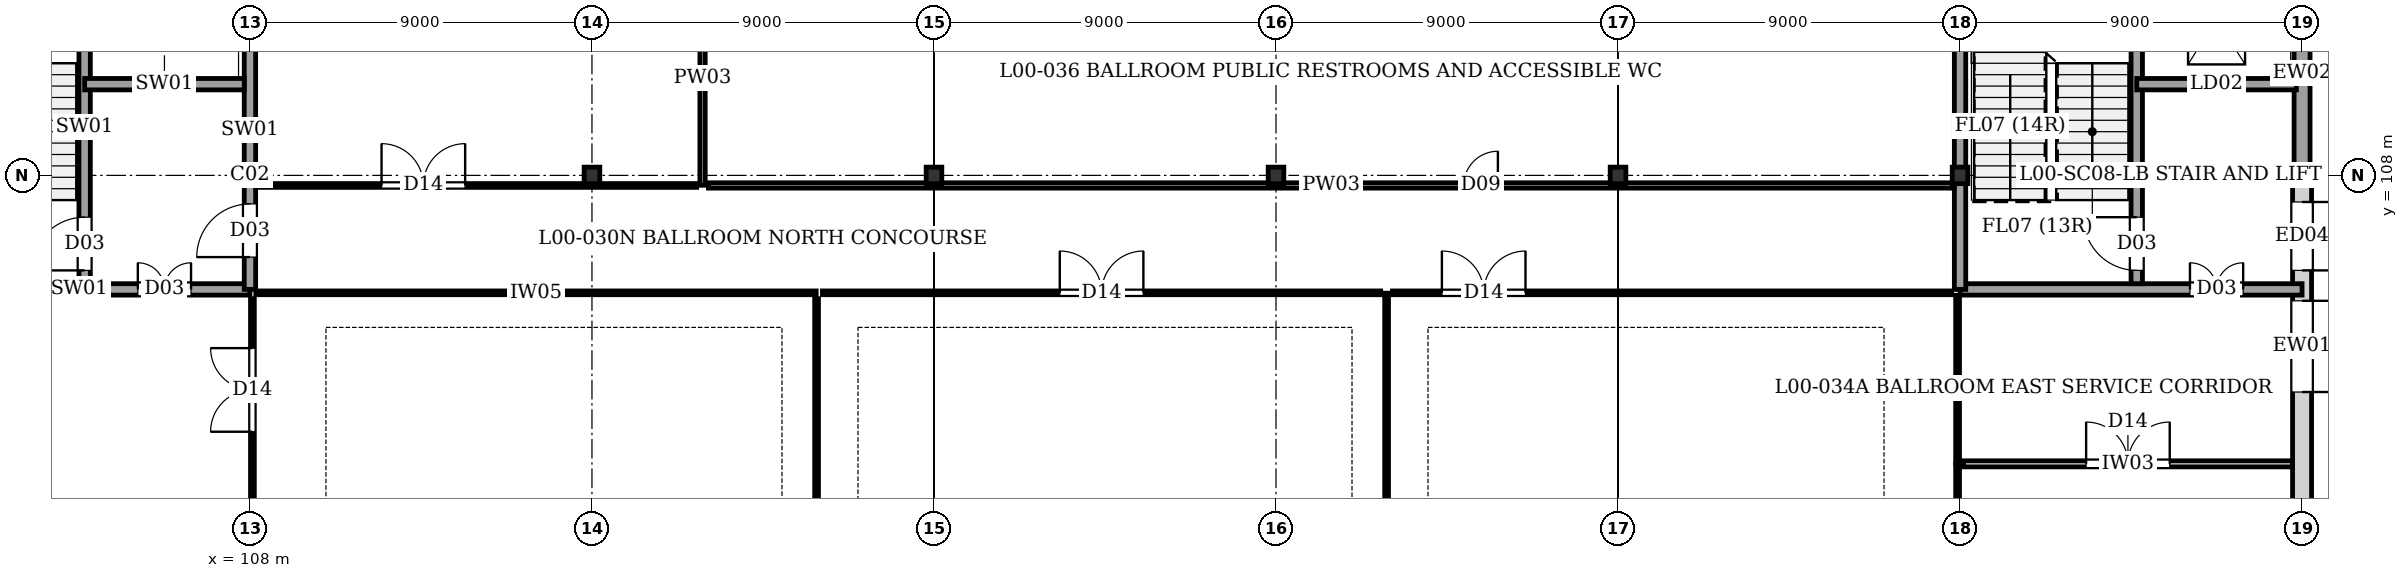
"""IFC4 building model, lengths in metres.
Left out: names, types, materials, properties, quantities, classifications, styles, units other than length and angle.
Written with IfcOpenShell. Run it as: python <this file> out.ifc"""

import sys

from ifc_helpers import new_model, si_unit, direction, frame, frame_2d, origin, origin_2d, place, context, subcontext, project, spatial, rectangle, i_section, extrude, element, fill, save


model = new_model("IFC4")
c1 = context("Model", 3, precision=1e-05, world=origin(), true_north=direction((0.0, 1.0)))
c2 = subcontext(c1, "Body", "Model", "MODEL_VIEW")
j1 = project(units=[si_unit("LENGTHUNIT", "METRE"), si_unit("PLANEANGLEUNIT", "RADIAN")], contexts=[c1])
p1 = place(None, origin())
s1 = spatial("IfcSite", under=j1, at=p1, CompositionType="ELEMENT")
p2 = place(p1, origin())
s2 = spatial("IfcBuilding", under=s1, at=p2, CompositionType="ELEMENT")
p3 = place(p2, origin())
s3 = spatial("IfcBuildingStorey", under=s2, at=p3, CompositionType="ELEMENT", Elevation=0.0)
for number, where, z_axis, x_axis in (
    (1, (108.0, 108.0, 0.0), (0.0, 0.0, 1.0), (1.0, 0.0, 0.0)),
    (2, (117.0, 108.0, 0.0), (0.0, 0.0, 1.0), (1.0, 0.0, 0.0)),
    (3, (126.0, 108.0, 0.0), (0.0, 0.0, 1.0), (1.0, 0.0, 0.0)),
    (4, (135.0, 108.0, 0.0), (0.0, 0.0, 1.0), (1.0, 0.0, 0.0)),
    (5, (144.0, 108.0, 0.0), (0.0, 0.0, 1.0), (1.0, 0.0, 0.0)),
    (6, (153.0, 108.0, 0.0), (0.0, 0.0, 1.0), (1.0, 0.0, 0.0)),
):
    element("IfcColumn", number, at=place(p3, frame(where, z_axis=z_axis, x_axis=x_axis)), inside=s3, PredefinedType="COLUMN", context=c2, shape_type="SweptSolid", body=[
        extrude(i_section(OverallWidth=0.412, OverallDepth=0.435, WebThickness=0.027, FlangeThickness=0.046, at=origin_2d()), origin(), (0.0, 0.0, 1.0), 4.32),
    ])
p4 = place(p3, frame((162.0, 108.0, 0.0), z_axis=(0.0, 0.0, 1.0), x_axis=(1.0, 0.0, 0.0)))
e7 = element("IfcColumn", 7, at=p4, inside=s3, PredefinedType="COLUMN", context=c2, shape_type="SweptSolid", body=[
    extrude(i_section(OverallWidth=0.3, OverallDepth=0.5, WebThickness=0.014, FlangeThickness=0.028, at=origin_2d()), origin(), (0.0, 0.0, 1.0), 4.32),
])
p5 = place(p3, frame((162.0, 114.0, 0.0), z_axis=(0.0, 0.0, 1.0), x_axis=(0.0, -1.0, 0.0)))
e8 = element("IfcWall", 8, at=p5, inside=s3, PredefinedType="SOLIDWALL", context=c2, shape_type="SweptSolid", body=[
    extrude(rectangle(XDim=6.0, YDim=0.42, at=frame_2d((3.0, 0.0))), origin(), (0.0, 0.0, 1.0), 4.055),
])
p6 = place(p3, frame((162.0, 108.0, 0.0), z_axis=(0.0, 0.0, 1.0), x_axis=(0.0, -1.0, 0.0)))
e9 = element("IfcWall", 9, at=p6, inside=s3, PredefinedType="SOLIDWALL", context=c2, shape_type="SweptSolid", body=[
    extrude(rectangle(XDim=9.0, YDim=0.5, at=frame_2d((4.5, 0.0))), origin(), (0.0, 0.0, 1.0), 3.695),
])
p7 = place(p6, frame((0.7, 0.0, 0.0)))
e10 = element("IfcOpeningElement", 10, at=p7, cuts=e9, PredefinedType="OPENING", context=c2, shape_type="SweptSolid", body=[
    extrude(rectangle(XDim=1.8, YDim=2.2, at=frame_2d((0.9, 1.1))), frame((0.0, 0.26, 0.0), z_axis=(0.0, -1.0, 0.0), x_axis=(1.0, 0.0, 0.0)), (0.0, 0.0, 1.0), 0.52),
])
p8 = place(p6, frame((3.3, 0.0, 0.0)))
e11 = element("IfcOpeningElement", 11, at=p8, cuts=e9, PredefinedType="OPENING", context=c2, shape_type="SweptSolid", body=[
    extrude(rectangle(XDim=2.4, YDim=2.5, at=frame_2d((1.2, 1.25))), frame((0.0, 0.26, 0.0), z_axis=(0.0, -1.0, 0.0), x_axis=(1.0, 0.0, 0.0)), (0.0, 0.0, 1.0), 0.52),
])
p9 = place(p3, frame((99.0, 105.0, 0.0), z_axis=(0.0, 0.0, 1.0), x_axis=(1.0, 0.0, 0.0)))
e12 = element("IfcWall", 12, at=p9, inside=s3, PredefinedType="SHEAR", context=c2, shape_type="SweptSolid", body=[
    extrude(rectangle(XDim=9.0, YDim=0.3, at=frame_2d((4.5, 0.0))), origin(), (0.0, 0.0, 1.0), 4.055),
])
p10 = place(p9, frame((6.05, 0.0, 0.0)))
e13 = element("IfcOpeningElement", 13, at=p10, cuts=e12, PredefinedType="OPENING", context=c2, shape_type="SweptSolid", body=[
    extrude(rectangle(XDim=1.4, YDim=2.02, at=frame_2d((0.7, 1.01))), frame((0.0, 0.16, 0.0), z_axis=(0.0, -1.0, 0.0), x_axis=(1.0, 0.0, 0.0)), (0.0, 0.0, 1.0), 0.32),
])
p11 = place(p3, frame((108.0, 105.0, 0.0), z_axis=(0.0, 0.0, 1.0), x_axis=(0.0, 1.0, 0.0)))
e14 = element("IfcWall", 14, at=p11, inside=s3, PredefinedType="SHEAR", context=c2, shape_type="SweptSolid", body=[
    extrude(rectangle(XDim=9.0, YDim=0.3, at=frame_2d((4.5, 0.0))), origin(), (0.0, 0.0, 1.0), 4.055),
])
p12 = place(p11, frame((0.85, 0.0, 0.0)))
e15 = element("IfcOpeningElement", 15, at=p12, cuts=e14, PredefinedType="OPENING", context=c2, shape_type="SweptSolid", body=[
    extrude(rectangle(XDim=1.4, YDim=2.02, at=frame_2d((0.7, 1.01))), frame((0.0, 0.16, 0.0), z_axis=(0.0, -1.0, 0.0), x_axis=(1.0, 0.0, 0.0)), (0.0, 0.0, 1.0), 0.32),
])
p13 = place(p3, frame((103.65, 105.15, 0.0), z_axis=(0.0, 0.0, 1.0), x_axis=(0.0, 1.0, 0.0)))
e16 = element("IfcWall", 16, at=p13, inside=s3, PredefinedType="SHEAR", context=c2, shape_type="SweptSolid", body=[
    extrude(rectangle(XDim=8.7, YDim=0.3, at=frame_2d((4.35, 0.0))), origin(), (0.0, 0.0, 1.0), 4.055),
])
p14 = place(p13, frame((0.35, 0.0, 0.0)))
e17 = element("IfcOpeningElement", 17, at=p14, cuts=e16, PredefinedType="OPENING", context=c2, shape_type="SweptSolid", body=[
    extrude(rectangle(XDim=1.4, YDim=2.02, at=frame_2d((0.7, 1.01))), frame((0.0, 0.16, 0.0), z_axis=(0.0, -1.0, 0.0), x_axis=(1.0, 0.0, 0.0)), (0.0, 0.0, 1.0), 0.32),
])
p15 = place(p3, frame((103.65, 110.4, 0.0), z_axis=(0.0, 0.0, 1.0), x_axis=(1.0, 0.0, 0.0)))
e18 = element("IfcWall", 18, at=p15, inside=s3, PredefinedType="SHEAR", context=c2, shape_type="SweptSolid", body=[
    extrude(rectangle(XDim=4.2, YDim=0.3, at=frame_2d((2.1, 0.0))), origin(), (0.0, 0.0, 1.0), 4.055),
])
p16 = place(p15, frame((1.5, 0.0, 0.0)))
e19 = element("IfcOpeningElement", 19, at=p16, cuts=e18, PredefinedType="OPENING", context=c2, shape_type="SweptSolid", body=[
    extrude(rectangle(XDim=1.2, YDim=2.2, at=frame_2d((0.6, 1.1))), frame((0.0, 0.16, 0.0), z_axis=(0.0, -1.0, 0.0), x_axis=(1.0, 0.0, 0.0)), (0.0, 0.0, 1.0), 0.32),
])
p17 = place(p3, frame((153.0, 105.0, 0.0), z_axis=(0.0, 0.0, 1.0), x_axis=(1.0, 0.0, 0.0)))
e20 = element("IfcWall", 20, at=p17, inside=s3, PredefinedType="SHEAR", context=c2, shape_type="SweptSolid", body=[
    extrude(rectangle(XDim=9.0, YDim=0.3, at=frame_2d((4.5, 0.0))), origin(), (0.0, 0.0, 1.0), 4.055),
])
p18 = place(p17, frame((6.05, 0.0, 0.0)))
e21 = element("IfcOpeningElement", 21, at=p18, cuts=e20, PredefinedType="OPENING", context=c2, shape_type="SweptSolid", body=[
    extrude(rectangle(XDim=1.4, YDim=2.02, at=frame_2d((0.7, 1.01))), frame((0.0, 0.16, 0.0), z_axis=(0.0, -1.0, 0.0), x_axis=(1.0, 0.0, 0.0)), (0.0, 0.0, 1.0), 0.32),
])
p19 = place(p3, frame((153.0, 105.0, 0.0), z_axis=(0.0, 0.0, 1.0), x_axis=(0.0, 1.0, 0.0)))
e22 = element("IfcWall", 22, at=p19, inside=s3, PredefinedType="SHEAR", context=c2, shape_type="SweptSolid", body=[
    extrude(rectangle(XDim=9.0, YDim=0.3, at=frame_2d((4.5, 0.0))), origin(), (0.0, 0.0, 1.0), 4.055),
])
p20 = place(p3, frame((157.65, 105.15, 0.0), z_axis=(0.0, 0.0, 1.0), x_axis=(0.0, 1.0, 0.0)))
e23 = element("IfcWall", 23, at=p20, inside=s3, PredefinedType="SHEAR", context=c2, shape_type="SweptSolid", body=[
    extrude(rectangle(XDim=8.7, YDim=0.3, at=frame_2d((4.35, 0.0))), origin(), (0.0, 0.0, 1.0), 4.055),
])
p21 = place(p20, frame((0.35, 0.0, 0.0)))
e24 = element("IfcOpeningElement", 24, at=p21, cuts=e23, PredefinedType="OPENING", context=c2, shape_type="SweptSolid", body=[
    extrude(rectangle(XDim=1.4, YDim=2.02, at=frame_2d((0.7, 1.01))), frame((0.0, 0.16, 0.0), z_axis=(0.0, -1.0, 0.0), x_axis=(1.0, 0.0, 0.0)), (0.0, 0.0, 1.0), 0.32),
])
p22 = place(p3, frame((157.65, 110.4, 0.0), z_axis=(0.0, 0.0, 1.0), x_axis=(1.0, 0.0, 0.0)))
e25 = element("IfcWall", 25, at=p22, inside=s3, PredefinedType="SHEAR", context=c2, shape_type="SweptSolid", body=[
    extrude(rectangle(XDim=4.2, YDim=0.3, at=frame_2d((2.1, 0.0))), origin(), (0.0, 0.0, 1.0), 4.055),
])
p23 = place(p22, frame((1.5, 0.0, 0.0)))
e26 = element("IfcOpeningElement", 26, at=p23, cuts=e25, PredefinedType="OPENING", context=c2, shape_type="SweptSolid", body=[
    extrude(rectangle(XDim=1.2, YDim=2.2, at=frame_2d((0.6, 1.1))), frame((0.0, 0.16, 0.0), z_axis=(0.0, -1.0, 0.0), x_axis=(1.0, 0.0, 0.0)), (0.0, 0.0, 1.0), 0.32),
])
p24 = place(p3, frame((108.155, 104.91, 0.0), z_axis=(0.0, 0.0, 1.0), x_axis=(1.0, 0.0, 0.0)))
e27 = element("IfcWall", 27, at=p24, inside=s3, PredefinedType="PARTITIONING", context=c2, shape_type="SweptSolid", body=[
    extrude(rectangle(XDim=14.745, YDim=0.1, at=frame_2d((7.373, 0.0))), origin(), (0.0, 0.0, 1.0), 4.055),
])
p25 = place(p3, frame((122.91, 72.255, 0.0), z_axis=(0.0, 0.0, 1.0), x_axis=(0.0, 1.0, 0.0)))
e28 = element("IfcWall", 28, at=p25, inside=s3, PredefinedType="PARTITIONING", context=c2, shape_type="SweptSolid", body=[
    extrude(rectangle(XDim=32.5, YDim=0.1, at=frame_2d((16.25, 0.0))), origin(), (0.0, 0.0, 1.0), 4.055),
])
p26 = place(p3, frame((137.91, 72.255, 0.0), z_axis=(0.0, 0.0, 1.0), x_axis=(0.0, 1.0, 0.0)))
e29 = element("IfcWall", 29, at=p26, inside=s3, PredefinedType="PARTITIONING", context=c2, shape_type="SweptSolid", body=[
    extrude(rectangle(XDim=32.645, YDim=0.1, at=frame_2d((16.323, 0.0))), origin(), (0.0, 0.0, 1.0), 4.055),
])
p27 = place(p3, frame((152.935, 100.42, 0.0), z_axis=(0.0, 0.0, 1.0), x_axis=(0.0, 1.0, 0.0)))
e30 = element("IfcWall", 30, at=p27, inside=s3, PredefinedType="PARTITIONING", context=c2, shape_type="SweptSolid", body=[
    extrude(rectangle(XDim=4.425, YDim=0.1, at=frame_2d((2.212, 0.0))), origin(), (0.0, 0.0, 1.0), 3.665),
])
p28 = place(p3, frame((119.91, 107.74, 0.0), z_axis=(0.0, 0.0, 1.0), x_axis=(0.0, 1.0, 0.0)))
e31 = element("IfcWall", 31, at=p28, inside=s3, PredefinedType="PLUMBINGWALL", context=c2, shape_type="SweptSolid", body=[
    extrude(rectangle(XDim=6.005, YDim=0.14, at=frame_2d((3.002, 0.0))), origin(), (0.0, 0.0, 1.0), 4.055),
])
p29 = place(p3, frame((123.065, 104.91, 0.0), z_axis=(0.0, 0.0, 1.0), x_axis=(1.0, 0.0, 0.0)))
e32 = element("IfcWall", 32, at=p29, inside=s3, PredefinedType="PARTITIONING", context=c2, shape_type="SweptSolid", body=[
    extrude(rectangle(XDim=14.69, YDim=0.1, at=frame_2d((7.345, 0.0))), origin(), (0.0, 0.0, 1.0), 4.055),
])
p30 = place(p29, frame((6.245, 0.0, 0.0)))
e33 = element("IfcOpeningElement", 33, at=p30, cuts=e32, PredefinedType="OPENING", context=c2, shape_type="SweptSolid", body=[
    extrude(rectangle(XDim=2.2, YDim=2.45, at=frame_2d((1.1, 1.225))), frame((0.0, 0.06, 0.0), z_axis=(0.0, -1.0, 0.0), x_axis=(1.0, 0.0, 0.0)), (0.0, 0.0, 1.0), 0.12),
])
p31 = place(p3, frame((138.065, 104.91, 0.0), z_axis=(0.0, 0.0, 1.0), x_axis=(1.0, 0.0, 0.0)))
e34 = element("IfcWall", 34, at=p31, inside=s3, PredefinedType="PARTITIONING", context=c2, shape_type="SweptSolid", body=[
    extrude(rectangle(XDim=14.715, YDim=0.1, at=frame_2d((7.357, 0.0))), origin(), (0.0, 0.0, 1.0), 4.055),
])
p32 = place(p31, frame((1.3, 0.0, 0.0)))
e35 = element("IfcOpeningElement", 35, at=p32, cuts=e34, PredefinedType="OPENING", context=c2, shape_type="SweptSolid", body=[
    extrude(rectangle(XDim=2.2, YDim=2.45, at=frame_2d((1.1, 1.225))), frame((0.0, 0.06, 0.0), z_axis=(0.0, -1.0, 0.0), x_axis=(1.0, 0.0, 0.0)), (0.0, 0.0, 1.0), 0.12),
])
p33 = place(p3, frame((108.155, 107.735, 0.0), z_axis=(0.0, 0.0, 1.0), x_axis=(1.0, 0.0, 0.0)))
e36 = element("IfcWall", 36, at=p33, inside=s3, PredefinedType="PARTITIONING", context=c2, shape_type="SweptSolid", body=[
    extrude(rectangle(XDim=11.6, YDim=0.1, at=frame_2d((5.8, 0.0))), origin(), (0.0, 0.0, 1.0), 4.055),
])
p34 = place(p33, frame((3.308, 0.0, 0.0)))
e37 = element("IfcOpeningElement", 37, at=p34, cuts=e36, PredefinedType="OPENING", context=c2, shape_type="SweptSolid", body=[
    extrude(rectangle(XDim=2.2, YDim=2.45, at=frame_2d((1.1, 1.225))), frame((0.0, 0.06, 0.0), z_axis=(0.0, -1.0, 0.0), x_axis=(1.0, 0.0, 0.0)), (0.0, 0.0, 1.0), 0.12),
])
p35 = place(p3, frame((120.065, 107.735, 0.0), z_axis=(0.0, 0.0, 1.0), x_axis=(1.0, 0.0, 0.0)))
e38 = element("IfcWall", 38, at=p35, inside=s3, PredefinedType="PLUMBINGWALL", context=c2, shape_type="SweptSolid", body=[
    extrude(rectangle(XDim=32.78, YDim=0.14, at=frame_2d((16.39, 0.0))), origin(), (0.0, 0.0, 1.0), 4.055),
])
p36 = place(p35, frame((19.874, 0.0, 0.0)))
e39 = element("IfcOpeningElement", 39, at=p36, cuts=e38, PredefinedType="OPENING", context=c2, shape_type="SweptSolid", body=[
    extrude(rectangle(XDim=0.9, YDim=2.1, at=frame_2d((0.45, 1.05))), frame((0.0, 0.08, 0.0), z_axis=(0.0, -1.0, 0.0), x_axis=(1.0, 0.0, 0.0)), (0.0, 0.0, 1.0), 0.16),
])
p37 = place(p3, frame((153.09, 100.41, 0.0), z_axis=(0.0, 0.0, 1.0), x_axis=(1.0, 0.0, 0.0)))
e40 = element("IfcWall", 40, at=p37, inside=s3, PredefinedType="PARTITIONING", context=c2, shape_type="SweptSolid", body=[
    extrude(rectangle(XDim=8.655, YDim=0.16, at=frame_2d((4.328, 0.0))), origin(), (0.0, 0.0, 1.0), 4.055),
])
p38 = place(p37, frame((3.228, 0.0, 0.0)))
e41 = element("IfcOpeningElement", 41, at=p38, cuts=e40, PredefinedType="OPENING", context=c2, shape_type="SweptSolid", body=[
    extrude(rectangle(XDim=2.2, YDim=2.45, at=frame_2d((1.1, 1.225))), frame((0.0, 0.09, 0.0), z_axis=(0.0, -1.0, 0.0), x_axis=(1.0, 0.0, 0.0)), (0.0, 0.0, 1.0), 0.18),
])
p39 = place(p3, frame((152.935, 98.98, 0.0), z_axis=(0.0, 0.0, 1.0), x_axis=(0.0, 1.0, 0.0)))
e42 = element("IfcWall", 42, at=p39, inside=s3, PredefinedType="PARTITIONING", context=c2, shape_type="SweptSolid", body=[
    extrude(rectangle(XDim=1.42, YDim=0.1, at=frame_2d((0.71, 0.0))), origin(), (0.0, 0.0, 1.0), 3.665),
])
p40 = place(p3, frame((108.065, 98.98, 0.0), z_axis=(0.0, 0.0, 1.0), x_axis=(0.0, 1.0, 0.0)))
e43 = element("IfcWall", 43, at=p40, inside=s3, PredefinedType="PARTITIONING", context=c2, shape_type="SweptSolid", body=[
    extrude(rectangle(XDim=5.775, YDim=0.1, at=frame_2d((2.887, 0.0))), origin(), (0.0, 0.0, 1.0), 3.695),
])
p41 = place(p40, frame((2.275, 0.0, 0.0)))
e44 = element("IfcOpeningElement", 44, at=p41, cuts=e43, PredefinedType="OPENING", context=c2, shape_type="SweptSolid", body=[
    extrude(rectangle(XDim=2.2, YDim=2.45, at=frame_2d((1.1, 1.225))), frame((0.0, 0.06, 0.0), z_axis=(0.0, -1.0, 0.0), x_axis=(1.0, 0.0, 0.0)), (0.0, 0.0, 1.0), 0.12),
])
p42 = place(p7, origin())
e45 = element("IfcDoor", 45, at=p42, inside=s3, OperationType="DOUBLE_DOOR_SINGLE_SWING", PredefinedType="DOOR", context=c2, shape_type="SweptSolid", body=[
    extrude(rectangle(XDim=1.8, YDim=2.2, at=frame_2d((0.9, 1.1))), frame((0.0, 0.025, 0.0), z_axis=(0.0, -1.0, 0.0), x_axis=(1.0, 0.0, 0.0)), (0.0, 0.0, 1.0), 0.05),
])
fill(e10, e45)
p43 = place(p8, origin())
e46 = element("IfcDoor", 46, at=p43, inside=s3, OperationType="DOUBLE_DOOR_SINGLE_SWING", PredefinedType="DOOR", context=c2, shape_type="SweptSolid", body=[
    extrude(rectangle(XDim=2.4, YDim=2.5, at=frame_2d((1.2, 1.25))), frame((0.0, 0.025, 0.0), z_axis=(0.0, -1.0, 0.0), x_axis=(1.0, 0.0, 0.0)), (0.0, 0.0, 1.0), 0.05),
])
fill(e11, e46)
p44 = place(p10, origin())
e47 = element("IfcDoor", 47, at=p44, inside=s3, OperationType="DOUBLE_DOOR_SINGLE_SWING", PredefinedType="DOOR", context=c2, shape_type="SweptSolid", body=[
    extrude(rectangle(XDim=1.4, YDim=2.02, at=frame_2d((0.7, 1.01))), frame((0.0, 0.025, 0.0), z_axis=(0.0, -1.0, 0.0), x_axis=(1.0, 0.0, 0.0)), (0.0, 0.0, 1.0), 0.05),
])
fill(e13, e47)
p45 = place(p12, origin())
e48 = element("IfcDoor", 48, at=p45, inside=s3, OperationType="SINGLE_SWING_LEFT", PredefinedType="DOOR", context=c2, shape_type="SweptSolid", body=[
    extrude(rectangle(XDim=1.4, YDim=2.02, at=frame_2d((0.7, 1.01))), frame((0.0, 0.025, 0.0), z_axis=(0.0, -1.0, 0.0), x_axis=(1.0, 0.0, 0.0)), (0.0, 0.0, 1.0), 0.05),
])
fill(e15, e48)
p46 = place(p14, origin())
e49 = element("IfcDoor", 49, at=p46, inside=s3, OperationType="SINGLE_SWING_LEFT", PredefinedType="DOOR", context=c2, shape_type="SweptSolid", body=[
    extrude(rectangle(XDim=1.4, YDim=2.02, at=frame_2d((0.7, 1.01))), frame((0.0, 0.025, 0.0), z_axis=(0.0, -1.0, 0.0), x_axis=(1.0, 0.0, 0.0)), (0.0, 0.0, 1.0), 0.05),
])
fill(e17, e49)
p47 = place(p16, origin())
e50 = element("IfcDoor", 50, at=p47, inside=s3, OperationType="DOUBLE_DOOR_SLIDING", PredefinedType="DOOR", context=c2, shape_type="SweptSolid", body=[
    extrude(rectangle(XDim=1.2, YDim=2.2, at=frame_2d((0.6, 1.1))), frame((0.0, 0.025, 0.0), z_axis=(0.0, -1.0, 0.0), x_axis=(1.0, 0.0, 0.0)), (0.0, 0.0, 1.0), 0.05),
])
fill(e19, e50)
p48 = place(p18, origin())
e51 = element("IfcDoor", 51, at=p48, inside=s3, OperationType="DOUBLE_DOOR_SINGLE_SWING", PredefinedType="DOOR", context=c2, shape_type="SweptSolid", body=[
    extrude(rectangle(XDim=1.4, YDim=2.02, at=frame_2d((0.7, 1.01))), frame((0.0, 0.025, 0.0), z_axis=(0.0, -1.0, 0.0), x_axis=(1.0, 0.0, 0.0)), (0.0, 0.0, 1.0), 0.05),
])
fill(e21, e51)
p49 = place(p21, origin())
e52 = element("IfcDoor", 52, at=p49, inside=s3, OperationType="SINGLE_SWING_RIGHT", PredefinedType="DOOR", context=c2, shape_type="SweptSolid", body=[
    extrude(rectangle(XDim=1.4, YDim=2.02, at=frame_2d((0.7, 1.01))), frame((0.0, 0.025, 0.0), z_axis=(0.0, -1.0, 0.0), x_axis=(1.0, 0.0, 0.0)), (0.0, 0.0, 1.0), 0.05),
])
fill(e24, e52)
p50 = place(p23, origin())
e53 = element("IfcDoor", 53, at=p50, inside=s3, OperationType="DOUBLE_DOOR_SLIDING", PredefinedType="DOOR", context=c2, shape_type="SweptSolid", body=[
    extrude(rectangle(XDim=1.2, YDim=2.2, at=frame_2d((0.6, 1.1))), frame((0.0, 0.025, 0.0), z_axis=(0.0, -1.0, 0.0), x_axis=(1.0, 0.0, 0.0)), (0.0, 0.0, 1.0), 0.05),
])
fill(e26, e53)
p51 = place(p41, origin())
e54 = element("IfcDoor", 54, at=p51, inside=s3, OperationType="DOUBLE_DOOR_SINGLE_SWING", PredefinedType="DOOR", context=c2, shape_type="SweptSolid", body=[
    extrude(rectangle(XDim=2.2, YDim=2.45, at=frame_2d((1.1, 1.225))), frame((0.0, 0.025, 0.0), z_axis=(0.0, -1.0, 0.0), x_axis=(1.0, 0.0, 0.0)), (0.0, 0.0, 1.0), 0.05),
])
fill(e44, e54)
p52 = place(p30, origin())
e55 = element("IfcDoor", 55, at=p52, inside=s3, OperationType="DOUBLE_DOOR_SINGLE_SWING", PredefinedType="DOOR", context=c2, shape_type="SweptSolid", body=[
    extrude(rectangle(XDim=2.2, YDim=2.45, at=frame_2d((1.1, 1.225))), frame((0.0, 0.025, 0.0), z_axis=(0.0, -1.0, 0.0), x_axis=(1.0, 0.0, 0.0)), (0.0, 0.0, 1.0), 0.05),
])
fill(e33, e55)
p53 = place(p32, origin())
e56 = element("IfcDoor", 56, at=p53, inside=s3, OperationType="DOUBLE_DOOR_SINGLE_SWING", PredefinedType="DOOR", context=c2, shape_type="SweptSolid", body=[
    extrude(rectangle(XDim=2.2, YDim=2.45, at=frame_2d((1.1, 1.225))), frame((0.0, 0.025, 0.0), z_axis=(0.0, -1.0, 0.0), x_axis=(1.0, 0.0, 0.0)), (0.0, 0.0, 1.0), 0.05),
])
fill(e35, e56)
p54 = place(p34, origin())
e57 = element("IfcDoor", 57, at=p54, inside=s3, OperationType="DOUBLE_DOOR_SINGLE_SWING", PredefinedType="DOOR", context=c2, shape_type="SweptSolid", body=[
    extrude(rectangle(XDim=2.2, YDim=2.45, at=frame_2d((1.1, 1.225))), frame((0.0, 0.025, 0.0), z_axis=(0.0, -1.0, 0.0), x_axis=(1.0, 0.0, 0.0)), (0.0, 0.0, 1.0), 0.05),
])
fill(e37, e57)
p55 = place(p36, origin())
e58 = element("IfcDoor", 58, at=p55, inside=s3, OperationType="SINGLE_SWING_RIGHT", PredefinedType="DOOR", context=c2, shape_type="SweptSolid", body=[
    extrude(rectangle(XDim=0.9, YDim=2.1, at=frame_2d((0.45, 1.05))), frame((0.0, 0.025, 0.0), z_axis=(0.0, -1.0, 0.0), x_axis=(1.0, 0.0, 0.0)), (0.0, 0.0, 1.0), 0.05),
])
fill(e39, e58)
p56 = place(p38, origin())
e59 = element("IfcDoor", 59, at=p56, inside=s3, OperationType="DOUBLE_DOOR_SINGLE_SWING", PredefinedType="DOOR", context=c2, shape_type="SweptSolid", body=[
    extrude(rectangle(XDim=2.2, YDim=2.45, at=frame_2d((1.1, 1.225))), frame((0.0, 0.025, 0.0), z_axis=(0.0, -1.0, 0.0), x_axis=(1.0, 0.0, 0.0)), (0.0, 0.0, 1.0), 0.05),
])
fill(e41, e59)
save(model, sys.argv[1])
